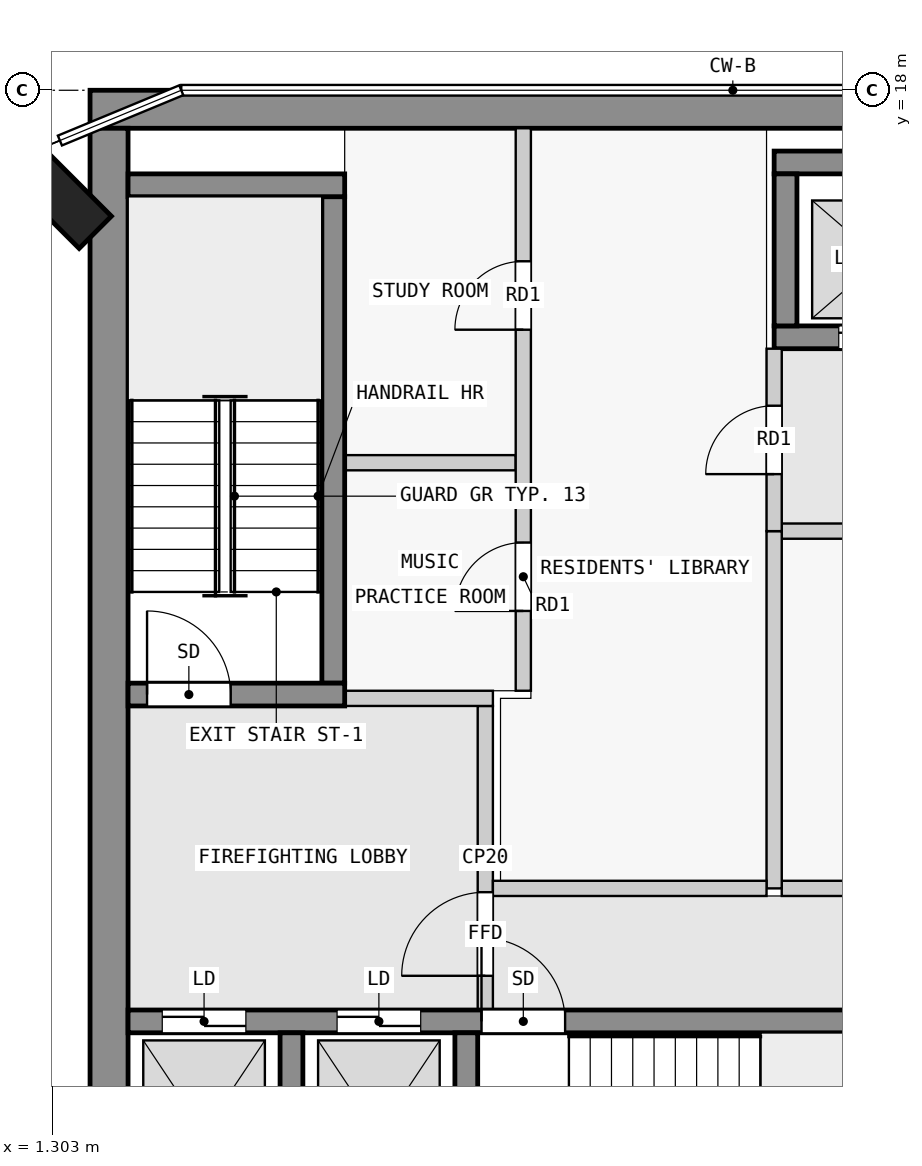
"""IFC4 building model, lengths in metres.
Left out: names, types, materials, properties, quantities, classifications, styles, units other than length and angle.
Written with IfcOpenShell. Run it as: python <this file> out.ifc"""

import sys

from ifc_helpers import new_model, si_unit, direction, frame, frame_2d, origin, origin_2d, place, context, subcontext, project, spatial, rectangle, extrude, element, fill, save


model = new_model("IFC4")
c1 = context("Model", 3, precision=1e-05, world=origin(), true_north=direction((0.0, 1.0)))
c2 = subcontext(c1, "Body", "Model", "MODEL_VIEW")
j1 = project(units=[si_unit("LENGTHUNIT", "METRE"), si_unit("PLANEANGLEUNIT", "RADIAN")], contexts=[c1])
p1 = place(None, origin())
s1 = spatial("IfcSite", under=j1, at=p1, CompositionType="ELEMENT")
p2 = place(p1, origin())
s2 = spatial("IfcBuilding", under=s1, at=p2, CompositionType="ELEMENT")
p3 = place(p2, frame((0.0, 0.0, 229.4)))
s3 = spatial("IfcBuildingStorey", under=s2, at=p3, CompositionType="ELEMENT", Elevation=229.4)
p4 = place(p3, frame((1.374, 16.626, 0.0), z_axis=(0.0, 0.0, 1.0), x_axis=(0.707106781187, 0.707106781187, 0.0)))
e1 = element("IfcColumn", 1, at=p4, inside=s3, PredefinedType="COLUMN", context=c2, shape_type="SweptSolid", body=[
    extrude(rectangle(XDim=0.6, YDim=1.4, at=origin_2d()), origin(), (0.0, 0.0, 1.0), 3.5),
])
p5 = place(p3, frame((1.8, 17.75, 0.0), z_axis=(0.0, 0.0, 1.0), x_axis=(1.0, 0.0, 0.0)))
e2 = element("IfcWall", 2, at=p5, inside=s3, PredefinedType="SHEAR", context=c2, shape_type="SweptSolid", body=[
    extrude(rectangle(XDim=20.7, YDim=0.5, at=frame_2d((10.35, 0.0))), origin(), (0.0, 0.0, 1.0), 3.25),
])
p6 = place(p3, frame((2.05, 2.5, 0.0), z_axis=(0.0, 0.0, 1.0), x_axis=(0.0, 1.0, 0.0)))
e3 = element("IfcWall", 3, at=p6, inside=s3, PredefinedType="SHEAR", context=c2, shape_type="SweptSolid", body=[
    extrude(rectangle(XDim=15.0, YDim=0.5, at=frame_2d((7.5, 0.0))), origin(), (0.0, 0.0, 1.0), 3.25),
])
for number, where, z_axis, x_axis in (
    (4, (4.45, 2.8, 0.0), (0.0, 0.0, 1.0), (0.0, 1.0, 0.0)),
    (5, (6.75, 2.8, 0.0), (0.0, 0.0, 1.0), (0.0, 1.0, 0.0)),
):
    element("IfcWall", number, at=place(p3, frame(where, z_axis=z_axis, x_axis=x_axis)), inside=s3, PredefinedType="SHEAR", context=c2, shape_type="SweptSolid", body=[
        extrude(rectangle(XDim=2.8, YDim=0.3, at=frame_2d((1.4, 0.0))), origin(), (0.0, 0.0, 1.0), 3.25),
    ])
p7 = place(p3, frame((2.3, 5.75, 0.0), z_axis=(0.0, 0.0, 1.0), x_axis=(1.0, 0.0, 0.0)))
e6 = element("IfcWall", 6, at=p7, inside=s3, PredefinedType="SHEAR", context=c2, shape_type="SweptSolid", body=[
    extrude(rectangle(XDim=18.8, YDim=0.3, at=frame_2d((9.4, 0.0))), origin(), (0.0, 0.0, 1.0), 3.25),
])
p8 = place(p7, frame((4.65, 0.0, 0.0)))
e7 = element("IfcOpeningElement", 7, at=p8, cuts=e6, PredefinedType="OPENING", context=c2, shape_type="SweptSolid", body=[
    extrude(rectangle(XDim=1.1, YDim=2.1, at=frame_2d((0.55, 1.05))), frame((0.0, 0.16, 0.0), z_axis=(0.0, -1.0, 0.0), x_axis=(1.0, 0.0, 0.0)), (0.0, 0.0, 1.0), 0.32),
])
p9 = place(p7, frame((0.45, 0.0, 0.0)))
e8 = element("IfcOpeningElement", 8, at=p9, cuts=e6, PredefinedType="OPENING", context=c2, shape_type="SweptSolid", body=[
    extrude(rectangle(XDim=1.1, YDim=2.1, at=frame_2d((0.55, 1.05))), frame((0.0, 0.16, 0.0), z_axis=(0.0, -1.0, 0.0), x_axis=(1.0, 0.0, 0.0)), (0.0, 0.0, 1.0), 0.32),
])
p10 = place(p7, frame((2.75, 0.0, 0.0)))
e9 = element("IfcOpeningElement", 9, at=p10, cuts=e6, PredefinedType="OPENING", context=c2, shape_type="SweptSolid", body=[
    extrude(rectangle(XDim=1.1, YDim=2.1, at=frame_2d((0.55, 1.05))), frame((0.0, 0.16, 0.0), z_axis=(0.0, -1.0, 0.0), x_axis=(1.0, 0.0, 0.0)), (0.0, 0.0, 1.0), 0.32),
])
p11 = place(p7, frame((11.95, 0.0, 0.0)))
e10 = element("IfcOpeningElement", 10, at=p11, cuts=e6, PredefinedType="OPENING", context=c2, shape_type="SweptSolid", body=[
    extrude(rectangle(XDim=0.9, YDim=2.1, at=frame_2d((0.45, 1.05))), frame((0.0, 0.16, 0.0), z_axis=(0.0, -1.0, 0.0), x_axis=(1.0, 0.0, 0.0)), (0.0, 0.0, 1.0), 0.32),
])
p12 = place(p7, frame((15.7, 0.0, 0.0)))
e11 = element("IfcOpeningElement", 11, at=p12, cuts=e6, PredefinedType="OPENING", context=c2, shape_type="SweptSolid", body=[
    extrude(rectangle(XDim=0.9, YDim=2.1, at=frame_2d((0.45, 1.05))), frame((0.0, 0.16, 0.0), z_axis=(0.0, -1.0, 0.0), x_axis=(1.0, 0.0, 0.0)), (0.0, 0.0, 1.0), 0.32),
])
p13 = place(p3, frame((2.3, 10.05, 0.0), z_axis=(0.0, 0.0, 1.0), x_axis=(1.0, 0.0, 0.0)))
e12 = element("IfcWall", 12, at=p13, inside=s3, PredefinedType="SHEAR", context=c2, shape_type="SweptSolid", body=[
    extrude(rectangle(XDim=2.85, YDim=0.3, at=frame_2d((1.425, 0.0))), origin(), (0.0, 0.0, 1.0), 3.25),
])
p14 = place(p13, frame((0.25, 0.0, 0.0)))
e13 = element("IfcOpeningElement", 13, at=p14, cuts=e12, PredefinedType="OPENING", context=c2, shape_type="SweptSolid", body=[
    extrude(rectangle(XDim=1.1, YDim=2.1, at=frame_2d((0.55, 1.05))), frame((0.0, 0.16, 0.0), z_axis=(0.0, -1.0, 0.0), x_axis=(1.0, 0.0, 0.0)), (0.0, 0.0, 1.0), 0.32),
])
p15 = place(p3, frame((5.0, 10.2, 0.0), z_axis=(0.0, 0.0, 1.0), x_axis=(0.0, 1.0, 0.0)))
e14 = element("IfcWall", 14, at=p15, inside=s3, PredefinedType="SHEAR", context=c2, shape_type="SweptSolid", body=[
    extrude(rectangle(XDim=6.4, YDim=0.3, at=frame_2d((3.2, 0.0))), origin(), (0.0, 0.0, 1.0), 3.25),
])
p16 = place(p3, frame((2.3, 16.75, 0.0), z_axis=(0.0, 0.0, 1.0), x_axis=(1.0, 0.0, 0.0)))
e15 = element("IfcWall", 15, at=p16, inside=s3, PredefinedType="SHEAR", context=c2, shape_type="SweptSolid", body=[
    extrude(rectangle(XDim=2.85, YDim=0.3, at=frame_2d((1.425, 0.0))), origin(), (0.0, 0.0, 1.0), 3.25),
])
p17 = place(p3, frame((10.8, 17.05, 0.0), z_axis=(0.0, 0.0, 1.0), x_axis=(1.0, 0.0, 0.0)))
e16 = element("IfcWall", 16, at=p17, inside=s3, PredefinedType="SHEAR", context=c2, shape_type="SweptSolid", body=[
    extrude(rectangle(XDim=7.8, YDim=0.3, at=frame_2d((3.9, 0.0))), origin(), (0.0, 0.0, 1.0), 3.25),
])
p18 = place(p3, frame((10.8, 14.75, 0.0), z_axis=(0.0, 0.0, 1.0), x_axis=(1.0, 0.0, 0.0)))
e17 = element("IfcWall", 17, at=p18, inside=s3, PredefinedType="SHEAR", context=c2, shape_type="SweptSolid", body=[
    extrude(rectangle(XDim=7.8, YDim=0.3, at=frame_2d((3.9, 0.0))), origin(), (0.0, 0.0, 1.0), 3.25),
])
p19 = place(p18, frame((0.85, 0.0, 0.0)))
e18 = element("IfcOpeningElement", 18, at=p19, cuts=e17, PredefinedType="OPENING", context=c2, shape_type="SweptSolid", body=[
    extrude(rectangle(XDim=1.1, YDim=2.1, at=frame_2d((0.55, 1.05))), frame((0.0, 0.16, 0.0), z_axis=(0.0, -1.0, 0.0), x_axis=(1.0, 0.0, 0.0)), (0.0, 0.0, 1.0), 0.32),
])
p20 = place(p18, frame((3.35, 0.0, 0.0)))
e19 = element("IfcOpeningElement", 19, at=p20, cuts=e17, PredefinedType="OPENING", context=c2, shape_type="SweptSolid", body=[
    extrude(rectangle(XDim=1.1, YDim=2.1, at=frame_2d((0.55, 1.05))), frame((0.0, 0.16, 0.0), z_axis=(0.0, -1.0, 0.0), x_axis=(1.0, 0.0, 0.0)), (0.0, 0.0, 1.0), 0.32),
])
p21 = place(p18, frame((5.85, 0.0, 0.0)))
e20 = element("IfcOpeningElement", 20, at=p21, cuts=e17, PredefinedType="OPENING", context=c2, shape_type="SweptSolid", body=[
    extrude(rectangle(XDim=1.1, YDim=2.1, at=frame_2d((0.55, 1.05))), frame((0.0, 0.16, 0.0), z_axis=(0.0, -1.0, 0.0), x_axis=(1.0, 0.0, 0.0)), (0.0, 0.0, 1.0), 0.32),
])
p22 = place(p3, frame((10.95, 14.9, 0.0), z_axis=(0.0, 0.0, 1.0), x_axis=(0.0, 1.0, 0.0)))
e21 = element("IfcWall", 21, at=p22, inside=s3, PredefinedType="SHEAR", context=c2, shape_type="SweptSolid", body=[
    extrude(rectangle(XDim=2.0, YDim=0.3, at=frame_2d((1.0, 0.0))), origin(), (0.0, 0.0, 1.0), 3.25),
])
p23 = place(p3, frame((7.0, 5.9, 0.0), z_axis=(0.0, 0.0, 1.0), x_axis=(0.0, 1.0, 0.0)))
e22 = element("IfcWall", 22, at=p23, inside=s3, PredefinedType="PARTITIONING", context=c2, shape_type="SweptSolid", body=[
    extrude(rectangle(XDim=4.0, YDim=0.2, at=frame_2d((2.0, 0.0))), origin(), (0.0, 0.0, 1.0), 3.25),
])
p24 = place(p23, frame((0.45, 0.0, 0.0)))
e23 = element("IfcOpeningElement", 23, at=p24, cuts=e22, PredefinedType="OPENING", context=c2, shape_type="SweptSolid", body=[
    extrude(rectangle(XDim=1.1, YDim=2.1, at=frame_2d((0.55, 1.05))), frame((0.0, 0.11, 0.0), z_axis=(0.0, -1.0, 0.0), x_axis=(1.0, 0.0, 0.0)), (0.0, 0.0, 1.0), 0.22),
])
p25 = place(p3, frame((5.15, 10.0, 0.0), z_axis=(0.0, 0.0, 1.0), x_axis=(1.0, 0.0, 0.0)))
e24 = element("IfcWall", 24, at=p25, inside=s3, PredefinedType="PARTITIONING", context=c2, shape_type="SweptSolid", body=[
    extrude(rectangle(XDim=1.95, YDim=0.2, at=frame_2d((0.975, 0.0))), origin(), (0.0, 0.0, 1.0), 3.25),
])
p26 = place(p3, frame((7.1, 7.5, 0.0), z_axis=(0.0, 0.0, 1.0), x_axis=(1.0, 0.0, 0.0)))
e25 = element("IfcWall", 25, at=p26, inside=s3, PredefinedType="PARTITIONING", context=c2, shape_type="SweptSolid", body=[
    extrude(rectangle(XDim=3.6, YDim=0.2, at=frame_2d((1.8, 0.0))), origin(), (0.0, 0.0, 1.0), 3.25),
])
p27 = place(p3, frame((10.8, 12.2, 0.0), z_axis=(0.0, 0.0, 1.0), x_axis=(0.0, 1.0, 0.0)))
e26 = element("IfcWall", 26, at=p27, inside=s3, PredefinedType="PARTITIONING", context=c2, shape_type="SweptSolid", body=[
    extrude(rectangle(XDim=2.4, YDim=0.2, at=frame_2d((1.2, 0.0))), origin(), (0.0, 0.0, 1.0), 3.25),
])
p28 = place(p27, frame((0.75, 0.0, 0.0)))
e27 = element("IfcOpeningElement", 27, at=p28, cuts=e26, PredefinedType="OPENING", context=c2, shape_type="SweptSolid", body=[
    extrude(rectangle(XDim=0.9, YDim=2.1, at=frame_2d((0.45, 1.05))), frame((0.0, 0.11, 0.0), z_axis=(0.0, -1.0, 0.0), x_axis=(1.0, 0.0, 0.0)), (0.0, 0.0, 1.0), 0.22),
])
p29 = place(p3, frame((10.8, 7.5, 0.0), z_axis=(0.0, 0.0, 1.0), x_axis=(0.0, 1.0, 0.0)))
e28 = element("IfcWall", 28, at=p29, inside=s3, PredefinedType="PARTITIONING", context=c2, shape_type="SweptSolid", body=[
    extrude(rectangle(XDim=4.7, YDim=0.2, at=frame_2d((2.35, 0.0))), origin(), (0.0, 0.0, 1.0), 3.25),
])
p30 = place(p3, frame((10.9, 7.5, 0.0), z_axis=(0.0, 0.0, 1.0), x_axis=(1.0, 0.0, 0.0)))
e29 = element("IfcWall", 29, at=p30, inside=s3, PredefinedType="PARTITIONING", context=c2, shape_type="SweptSolid", body=[
    extrude(rectangle(XDim=8.6, YDim=0.2, at=frame_2d((4.3, 0.0))), origin(), (0.0, 0.0, 1.0), 3.25),
])
p31 = place(p3, frame((10.9, 12.2, 0.0), z_axis=(0.0, 0.0, 1.0), x_axis=(1.0, 0.0, 0.0)))
e30 = element("IfcWall", 30, at=p31, inside=s3, PredefinedType="PARTITIONING", context=c2, shape_type="SweptSolid", body=[
    extrude(rectangle(XDim=8.6, YDim=0.2, at=frame_2d((4.3, 0.0))), origin(), (0.0, 0.0, 1.0), 3.25),
])
p32 = place(p31, frame((1.425, 0.0, 0.0)))
e31 = element("IfcOpeningElement", 31, at=p32, cuts=e30, PredefinedType="OPENING", context=c2, shape_type="SweptSolid", body=[
    extrude(rectangle(XDim=0.9, YDim=2.1, at=frame_2d((0.45, 1.05))), frame((0.0, 0.11, 0.0), z_axis=(0.0, -1.0, 0.0), x_axis=(1.0, 0.0, 0.0)), (0.0, 0.0, 1.0), 0.22),
])
p33 = place(p31, frame((5.825, 0.0, 0.0)))
e32 = element("IfcOpeningElement", 32, at=p33, cuts=e30, PredefinedType="OPENING", context=c2, shape_type="SweptSolid", body=[
    extrude(rectangle(XDim=0.9, YDim=2.1, at=frame_2d((0.45, 1.05))), frame((0.0, 0.11, 0.0), z_axis=(0.0, -1.0, 0.0), x_axis=(1.0, 0.0, 0.0)), (0.0, 0.0, 1.0), 0.22),
])
p34 = place(p3, frame((7.5, 10.1, 0.0), z_axis=(0.0, 0.0, 1.0), x_axis=(0.0, 1.0, 0.0)))
e33 = element("IfcWall", 33, at=p34, inside=s3, PredefinedType="PARTITIONING", context=c2, shape_type="SweptSolid", body=[
    extrude(rectangle(XDim=7.4, YDim=0.2, at=frame_2d((3.7, 0.0))), origin(), (0.0, 0.0, 1.0), 3.25),
])
p35 = place(p34, frame((1.05, 0.0, 0.0)))
e34 = element("IfcOpeningElement", 34, at=p35, cuts=e33, PredefinedType="OPENING", context=c2, shape_type="SweptSolid", body=[
    extrude(rectangle(XDim=0.9, YDim=2.1, at=frame_2d((0.45, 1.05))), frame((0.0, 0.11, 0.0), z_axis=(0.0, -1.0, 0.0), x_axis=(1.0, 0.0, 0.0)), (0.0, 0.0, 1.0), 0.22),
])
p36 = place(p34, frame((4.75, 0.0, 0.0)))
e35 = element("IfcOpeningElement", 35, at=p36, cuts=e33, PredefinedType="OPENING", context=c2, shape_type="SweptSolid", body=[
    extrude(rectangle(XDim=0.9, YDim=2.1, at=frame_2d((0.45, 1.05))), frame((0.0, 0.11, 0.0), z_axis=(0.0, -1.0, 0.0), x_axis=(1.0, 0.0, 0.0)), (0.0, 0.0, 1.0), 0.22),
])
p37 = place(p3, frame((5.15, 13.1, 0.0), z_axis=(0.0, 0.0, 1.0), x_axis=(1.0, 0.0, 0.0)))
e36 = element("IfcWall", 36, at=p37, inside=s3, PredefinedType="PARTITIONING", context=c2, shape_type="SweptSolid", body=[
    extrude(rectangle(XDim=2.25, YDim=0.2, at=frame_2d((1.125, 0.0))), origin(), (0.0, 0.0, 1.0), 3.25),
])
p38 = place(p24, origin())
e37 = element("IfcDoor", 37, at=p38, inside=s3, OperationType="SINGLE_SWING_LEFT", PredefinedType="DOOR", context=c2, shape_type="SweptSolid", body=[
    extrude(rectangle(XDim=1.1, YDim=2.1, at=frame_2d((0.55, 1.05))), frame((0.0, 0.025, 0.0), z_axis=(0.0, -1.0, 0.0), x_axis=(1.0, 0.0, 0.0)), (0.0, 0.0, 1.0), 0.05),
])
fill(e23, e37)
p39 = place(p14, origin())
e38 = element("IfcDoor", 38, at=p39, inside=s3, OperationType="SINGLE_SWING_RIGHT", PredefinedType="DOOR", context=c2, shape_type="SweptSolid", body=[
    extrude(rectangle(XDim=1.1, YDim=2.1, at=frame_2d((0.55, 1.05))), frame((0.0, 0.025, 0.0), z_axis=(0.0, -1.0, 0.0), x_axis=(1.0, 0.0, 0.0)), (0.0, 0.0, 1.0), 0.05),
])
fill(e13, e38)
p40 = place(p28, origin())
e39 = element("IfcDoor", 39, at=p40, inside=s3, OperationType="SINGLE_SWING_LEFT", PredefinedType="DOOR", context=c2, shape_type="SweptSolid", body=[
    extrude(rectangle(XDim=0.9, YDim=2.1, at=frame_2d((0.45, 1.05))), frame((0.0, 0.025, 0.0), z_axis=(0.0, -1.0, 0.0), x_axis=(1.0, 0.0, 0.0)), (0.0, 0.0, 1.0), 0.05),
])
fill(e27, e39)
p41 = place(p8, origin())
e40 = element("IfcDoor", 40, at=p41, inside=s3, OperationType="SINGLE_SWING_LEFT", PredefinedType="DOOR", context=c2, shape_type="SweptSolid", body=[
    extrude(rectangle(XDim=1.1, YDim=2.1, at=frame_2d((0.55, 1.05))), frame((0.0, 0.025, 0.0), z_axis=(0.0, -1.0, 0.0), x_axis=(1.0, 0.0, 0.0)), (0.0, 0.0, 1.0), 0.05),
])
fill(e7, e40)
p42 = place(p9, origin())
e41 = element("IfcDoor", 41, at=p42, inside=s3, OperationType="DOUBLE_DOOR_SLIDING", PredefinedType="DOOR", context=c2, shape_type="SweptSolid", body=[
    extrude(rectangle(XDim=1.1, YDim=2.1, at=frame_2d((0.55, 1.05))), frame((0.0, 0.025, 0.0), z_axis=(0.0, -1.0, 0.0), x_axis=(1.0, 0.0, 0.0)), (0.0, 0.0, 1.0), 0.05),
])
fill(e8, e41)
p43 = place(p10, origin())
e42 = element("IfcDoor", 42, at=p43, inside=s3, OperationType="DOUBLE_DOOR_SLIDING", PredefinedType="DOOR", context=c2, shape_type="SweptSolid", body=[
    extrude(rectangle(XDim=1.1, YDim=2.1, at=frame_2d((0.55, 1.05))), frame((0.0, 0.025, 0.0), z_axis=(0.0, -1.0, 0.0), x_axis=(1.0, 0.0, 0.0)), (0.0, 0.0, 1.0), 0.05),
])
fill(e9, e42)
p44 = place(p19, origin())
e43 = element("IfcDoor", 43, at=p44, inside=s3, OperationType="DOUBLE_DOOR_SLIDING", PredefinedType="DOOR", context=c2, shape_type="SweptSolid", body=[
    extrude(rectangle(XDim=1.1, YDim=2.1, at=frame_2d((0.55, 1.05))), frame((0.0, 0.025, 0.0), z_axis=(0.0, -1.0, 0.0), x_axis=(1.0, 0.0, 0.0)), (0.0, 0.0, 1.0), 0.05),
])
fill(e18, e43)
p45 = place(p35, origin())
e44 = element("IfcDoor", 44, at=p45, inside=s3, OperationType="SINGLE_SWING_RIGHT", PredefinedType="DOOR", context=c2, shape_type="SweptSolid", body=[
    extrude(rectangle(XDim=0.9, YDim=2.1, at=frame_2d((0.45, 1.05))), frame((0.0, 0.025, 0.0), z_axis=(0.0, -1.0, 0.0), x_axis=(1.0, 0.0, 0.0)), (0.0, 0.0, 1.0), 0.05),
])
fill(e34, e44)
p46 = place(p36, origin())
e45 = element("IfcDoor", 45, at=p46, inside=s3, OperationType="SINGLE_SWING_RIGHT", PredefinedType="DOOR", context=c2, shape_type="SweptSolid", body=[
    extrude(rectangle(XDim=0.9, YDim=2.1, at=frame_2d((0.45, 1.05))), frame((0.0, 0.025, 0.0), z_axis=(0.0, -1.0, 0.0), x_axis=(1.0, 0.0, 0.0)), (0.0, 0.0, 1.0), 0.05),
])
fill(e35, e45)
save(model, sys.argv[1])
